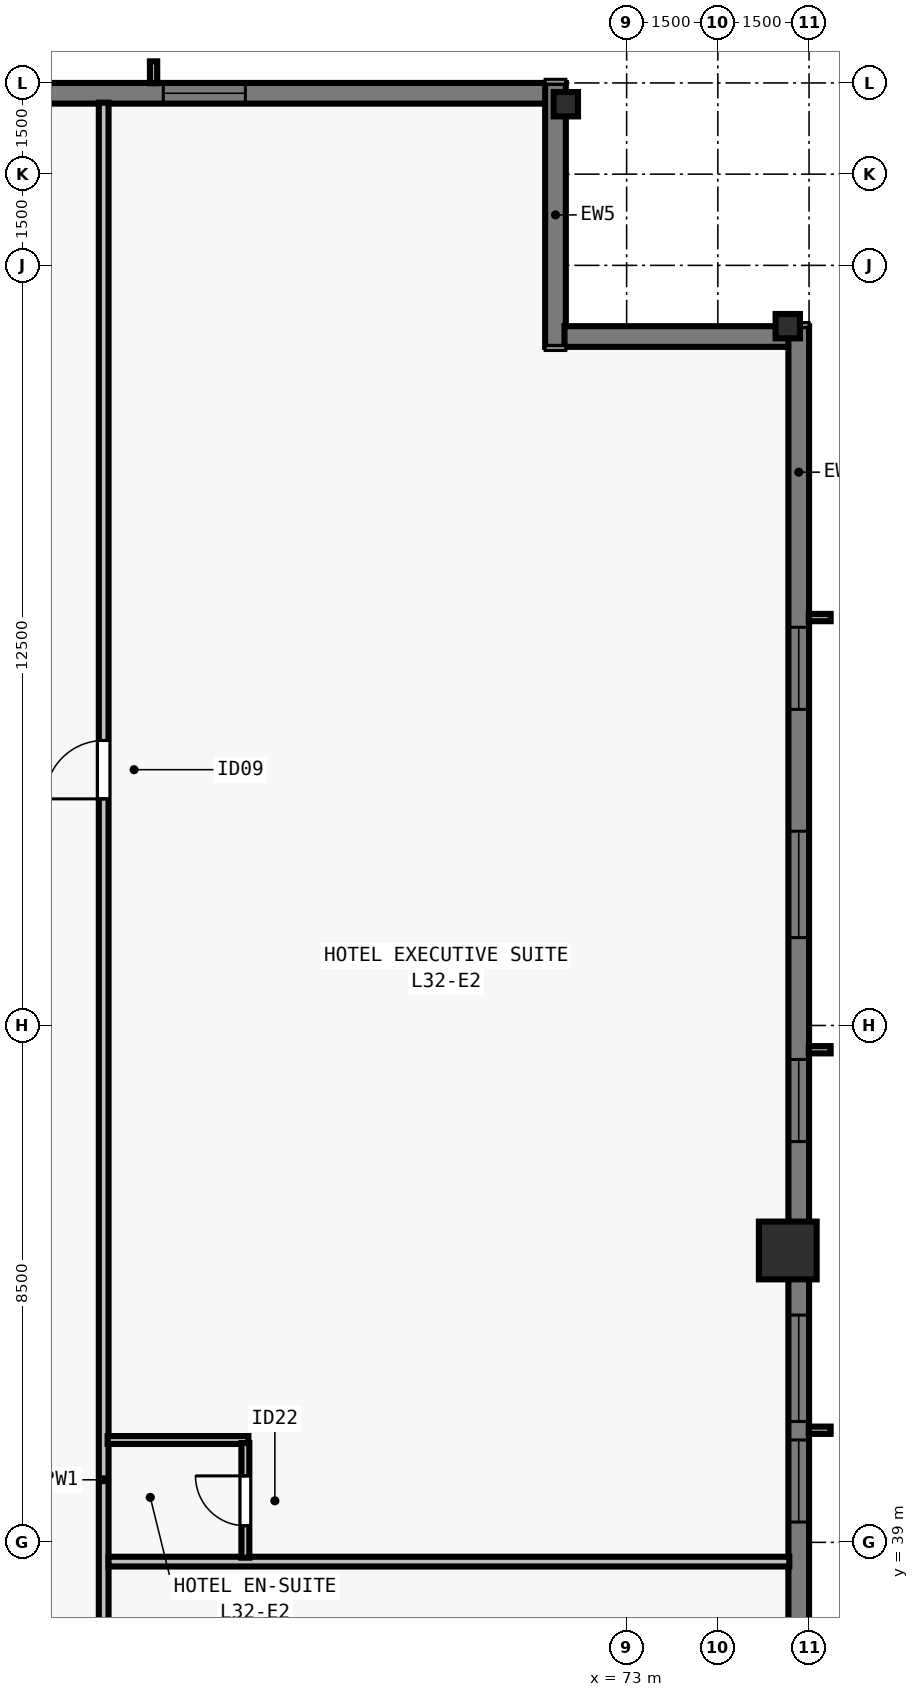
"""IFC4 building model, lengths in metres.
Left out: names, types, materials, properties, quantities, classifications, styles, units other than length and angle.
Written with IfcOpenShell. Run it as: python <this file> out.ifc"""

import sys

from ifc_helpers import new_model, si_unit, direction, frame, frame_2d, origin, origin_2d, place, context, subcontext, project, spatial, rectangle, i_section, extrude, element, fill, save


model = new_model("IFC4")
c1 = context("Model", 3, precision=1e-05, world=origin(), true_north=direction((0.0, 1.0)))
c2 = subcontext(c1, "Body", "Model", "MODEL_VIEW")
j1 = project(units=[si_unit("LENGTHUNIT", "METRE"), si_unit("PLANEANGLEUNIT", "RADIAN")], contexts=[c1])
p1 = place(None, origin())
s1 = spatial("IfcSite", under=j1, at=p1, CompositionType="ELEMENT")
p2 = place(p1, origin())
s2 = spatial("IfcBuilding", under=s1, at=p2, CompositionType="ELEMENT")
p3 = place(p2, frame((0.0, 0.0, 120.0)))
s3 = spatial("IfcBuildingStorey", under=s2, at=p3, CompositionType="ELEMENT", Elevation=120.0)
p4 = place(p3, frame((75.65, 43.8, 0.0), z_axis=(0.0, 0.0, 1.0), x_axis=(0.0, 1.0, 0.0)))
e1 = element("IfcColumn", 1, at=p4, inside=s3, PredefinedType="COLUMN", context=c2, shape_type="SweptSolid", body=[
    extrude(rectangle(XDim=0.95, YDim=0.95, at=origin_2d()), origin(), (0.0, 0.0, 1.0), 3.5),
])
for number, where, z_axis, x_axis in (
    (2, (75.65, 59.0, 0.0), (0.0, 0.0, 1.0), (0.0, 1.0, 0.0)),
    (3, (72.0, 62.65, 0.0), (0.0, 0.0, 1.0), (1.0, 0.0, 0.0)),
):
    element("IfcColumn", number, at=place(p3, frame(where, z_axis=z_axis, x_axis=x_axis)), inside=s3, PredefinedType="COLUMN", context=c2, shape_type="SweptSolid", body=[
        extrude(i_section(OverallWidth=0.4, OverallDepth=0.4, WebThickness=0.022, FlangeThickness=0.036, at=origin_2d()), origin(), (0.0, 0.0, 1.0), 3.5),
    ])
p5 = place(p3, frame((32.0, 62.83, 0.0), z_axis=(0.0, 0.0, 1.0), x_axis=(1.0, 0.0, 0.0)))
e4 = element("IfcWall", 4, at=p5, inside=s3, PredefinedType="SOLIDWALL", context=c2, shape_type="SweptSolid", body=[
    extrude(rectangle(XDim=39.682, YDim=0.34, at=frame_2d((19.841, 0.0))), origin(), (0.0, 0.0, 1.0), 3.28),
])
p6 = place(p5, frame((4.102, 0.0, 0.8)))
e5 = element("IfcOpeningElement", 5, at=p6, cuts=e4, PredefinedType="OPENING", context=c2, shape_type="SweptSolid", body=[
    extrude(rectangle(XDim=1.35, YDim=1.66, at=frame_2d((0.675, 0.83))), frame((0.0, 0.18, 0.0), z_axis=(0.0, -1.0, 0.0), x_axis=(1.0, 0.0, 0.0)), (0.0, 0.0, 1.0), 0.36),
])
p7 = place(p5, frame((8.755, 0.0, 0.8)))
e6 = element("IfcOpeningElement", 6, at=p7, cuts=e4, PredefinedType="OPENING", context=c2, shape_type="SweptSolid", body=[
    extrude(rectangle(XDim=1.75, YDim=1.66, at=frame_2d((0.875, 0.83))), frame((0.0, 0.18, 0.0), z_axis=(0.0, -1.0, 0.0), x_axis=(1.0, 0.0, 0.0)), (0.0, 0.0, 1.0), 0.36),
])
p8 = place(p5, frame((12.059, 0.0, 0.8)))
e7 = element("IfcOpeningElement", 7, at=p8, cuts=e4, PredefinedType="OPENING", context=c2, shape_type="SweptSolid", body=[
    extrude(rectangle(XDim=1.35, YDim=1.66, at=frame_2d((0.675, 0.83))), frame((0.0, 0.18, 0.0), z_axis=(0.0, -1.0, 0.0), x_axis=(1.0, 0.0, 0.0)), (0.0, 0.0, 1.0), 0.36),
])
p9 = place(p5, frame((16.262, 0.0, 0.8)))
e8 = element("IfcOpeningElement", 8, at=p9, cuts=e4, PredefinedType="OPENING", context=c2, shape_type="SweptSolid", body=[
    extrude(rectangle(XDim=1.75, YDim=1.66, at=frame_2d((0.875, 0.83))), frame((0.0, 0.18, 0.0), z_axis=(0.0, -1.0, 0.0), x_axis=(1.0, 0.0, 0.0)), (0.0, 0.0, 1.0), 0.36),
])
p10 = place(p5, frame((18.316, 0.0, 0.8)))
e9 = element("IfcOpeningElement", 9, at=p10, cuts=e4, PredefinedType="OPENING", context=c2, shape_type="SweptSolid", body=[
    extrude(rectangle(XDim=1.35, YDim=1.66, at=frame_2d((0.675, 0.83))), frame((0.0, 0.18, 0.0), z_axis=(0.0, -1.0, 0.0), x_axis=(1.0, 0.0, 0.0)), (0.0, 0.0, 1.0), 0.36),
])
p11 = place(p5, frame((22.07, 0.0, 0.8)))
e10 = element("IfcOpeningElement", 10, at=p11, cuts=e4, PredefinedType="OPENING", context=c2, shape_type="SweptSolid", body=[
    extrude(rectangle(XDim=1.75, YDim=1.66, at=frame_2d((0.875, 0.83))), frame((0.0, 0.18, 0.0), z_axis=(0.0, -1.0, 0.0), x_axis=(1.0, 0.0, 0.0)), (0.0, 0.0, 1.0), 0.36),
])
p12 = place(p5, frame((26.273, 0.0, 0.8)))
e11 = element("IfcOpeningElement", 11, at=p12, cuts=e4, PredefinedType="OPENING", context=c2, shape_type="SweptSolid", body=[
    extrude(rectangle(XDim=1.35, YDim=1.66, at=frame_2d((0.675, 0.83))), frame((0.0, 0.18, 0.0), z_axis=(0.0, -1.0, 0.0), x_axis=(1.0, 0.0, 0.0)), (0.0, 0.0, 1.0), 0.36),
])
p13 = place(p5, frame((33.38, 0.0, 0.8)))
e12 = element("IfcOpeningElement", 12, at=p13, cuts=e4, PredefinedType="OPENING", context=c2, shape_type="SweptSolid", body=[
    extrude(rectangle(XDim=1.35, YDim=1.66, at=frame_2d((0.675, 0.83))), frame((0.0, 0.18, 0.0), z_axis=(0.0, -1.0, 0.0), x_axis=(1.0, 0.0, 0.0)), (0.0, 0.0, 1.0), 0.36),
])
p14 = place(p3, frame((71.83, 63.0, 0.0), z_axis=(0.0, 0.0, 1.0), x_axis=(0.0, -1.0, 0.0)))
e13 = element("IfcWall", 13, at=p14, inside=s3, PredefinedType="SOLIDWALL", context=c2, shape_type="SweptSolid", body=[
    extrude(rectangle(XDim=4.34, YDim=0.34, at=frame_2d((2.17, 0.0))), origin(), (0.0, 0.0, 1.0), 3.28),
])
p15 = place(p3, frame((71.978, 58.83, 0.0), z_axis=(0.0, 0.0, 1.0), x_axis=(1.0, 0.0, 0.0)))
e14 = element("IfcWall", 14, at=p15, inside=s3, PredefinedType="SOLIDWALL", context=c2, shape_type="SweptSolid", body=[
    extrude(rectangle(XDim=3.704, YDim=0.34, at=frame_2d((1.852, 0.0))), origin(), (0.0, 0.0, 1.0), 3.28),
])
p16 = place(p3, frame((75.83, 59.0, 0.0), z_axis=(0.0, 0.0, 1.0), x_axis=(0.0, -1.0, 0.0)))
e15 = element("IfcWall", 15, at=p16, inside=s3, PredefinedType="SOLIDWALL", context=c2, shape_type="SweptSolid", body=[
    extrude(rectangle(XDim=39.682, YDim=0.34, at=frame_2d((19.841, 0.0))), origin(), (0.0, 0.0, 1.0), 3.28),
])
p17 = place(p16, frame((4.952, 0.0, 0.8)))
e16 = element("IfcOpeningElement", 16, at=p17, cuts=e15, PredefinedType="OPENING", context=c2, shape_type="SweptSolid", body=[
    extrude(rectangle(XDim=1.35, YDim=1.66, at=frame_2d((0.675, 0.83))), frame((0.0, 0.18, 0.0), z_axis=(0.0, -1.0, 0.0), x_axis=(1.0, 0.0, 0.0)), (0.0, 0.0, 1.0), 0.36),
])
p18 = place(p16, frame((8.305, 0.0, 0.8)))
e17 = element("IfcOpeningElement", 17, at=p18, cuts=e15, PredefinedType="OPENING", context=c2, shape_type="SweptSolid", body=[
    extrude(rectangle(XDim=1.75, YDim=1.66, at=frame_2d((0.875, 0.83))), frame((0.0, 0.18, 0.0), z_axis=(0.0, -1.0, 0.0), x_axis=(1.0, 0.0, 0.0)), (0.0, 0.0, 1.0), 0.36),
])
p19 = place(p16, frame((12.059, 0.0, 0.8)))
e18 = element("IfcOpeningElement", 18, at=p19, cuts=e15, PredefinedType="OPENING", context=c2, shape_type="SweptSolid", body=[
    extrude(rectangle(XDim=1.35, YDim=1.66, at=frame_2d((0.675, 0.83))), frame((0.0, 0.18, 0.0), z_axis=(0.0, -1.0, 0.0), x_axis=(1.0, 0.0, 0.0)), (0.0, 0.0, 1.0), 0.36),
])
p20 = place(p16, frame((16.262, 0.0, 0.8)))
e19 = element("IfcOpeningElement", 19, at=p20, cuts=e15, PredefinedType="OPENING", context=c2, shape_type="SweptSolid", body=[
    extrude(rectangle(XDim=1.75, YDim=1.66, at=frame_2d((0.875, 0.83))), frame((0.0, 0.18, 0.0), z_axis=(0.0, -1.0, 0.0), x_axis=(1.0, 0.0, 0.0)), (0.0, 0.0, 1.0), 0.36),
])
p21 = place(p16, frame((18.316, 0.0, 0.8)))
e20 = element("IfcOpeningElement", 20, at=p21, cuts=e15, PredefinedType="OPENING", context=c2, shape_type="SweptSolid", body=[
    extrude(rectangle(XDim=1.35, YDim=1.66, at=frame_2d((0.675, 0.83))), frame((0.0, 0.18, 0.0), z_axis=(0.0, -1.0, 0.0), x_axis=(1.0, 0.0, 0.0)), (0.0, 0.0, 1.0), 0.36),
])
p22 = place(p16, frame((22.07, 0.0, 0.8)))
e21 = element("IfcOpeningElement", 21, at=p22, cuts=e15, PredefinedType="OPENING", context=c2, shape_type="SweptSolid", body=[
    extrude(rectangle(XDim=1.75, YDim=1.66, at=frame_2d((0.875, 0.83))), frame((0.0, 0.18, 0.0), z_axis=(0.0, -1.0, 0.0), x_axis=(1.0, 0.0, 0.0)), (0.0, 0.0, 1.0), 0.36),
])
p23 = place(p16, frame((26.273, 0.0, 0.8)))
e22 = element("IfcOpeningElement", 22, at=p23, cuts=e15, PredefinedType="OPENING", context=c2, shape_type="SweptSolid", body=[
    extrude(rectangle(XDim=1.35, YDim=1.66, at=frame_2d((0.675, 0.83))), frame((0.0, 0.18, 0.0), z_axis=(0.0, -1.0, 0.0), x_axis=(1.0, 0.0, 0.0)), (0.0, 0.0, 1.0), 0.36),
])
p24 = place(p16, frame((29.627, 0.0, 0.8)))
e23 = element("IfcOpeningElement", 23, at=p24, cuts=e15, PredefinedType="OPENING", context=c2, shape_type="SweptSolid", body=[
    extrude(rectangle(XDim=1.75, YDim=1.66, at=frame_2d((0.875, 0.83))), frame((0.0, 0.18, 0.0), z_axis=(0.0, -1.0, 0.0), x_axis=(1.0, 0.0, 0.0)), (0.0, 0.0, 1.0), 0.36),
])
p25 = place(p16, frame((33.38, 0.0, 0.8)))
e24 = element("IfcOpeningElement", 24, at=p25, cuts=e15, PredefinedType="OPENING", context=c2, shape_type="SweptSolid", body=[
    extrude(rectangle(XDim=1.35, YDim=1.66, at=frame_2d((0.675, 0.83))), frame((0.0, 0.18, 0.0), z_axis=(0.0, -1.0, 0.0), x_axis=(1.0, 0.0, 0.0)), (0.0, 0.0, 1.0), 0.36),
])
p26 = place(p3, frame((64.4, 15.325, 0.0), z_axis=(0.0, 0.0, 1.0), x_axis=(0.0, 1.0, 0.0)))
e25 = element("IfcWall", 25, at=p26, inside=s3, PredefinedType="PARTITIONING", context=c2, shape_type="SweptSolid", body=[
    extrude(rectangle(XDim=47.35, YDim=0.16, at=frame_2d((23.675, 0.0))), origin(), (0.0, 0.0, 1.0), 2.555),
])
p27 = place(p26, frame((12.547, 0.0, 0.0)))
e26 = element("IfcOpeningElement", 26, at=p27, cuts=e25, PredefinedType="OPENING", context=c2, shape_type="SweptSolid", body=[
    extrude(rectangle(XDim=0.96, YDim=2.15, at=frame_2d((0.48, 1.075))), frame((0.0, 0.09, 0.0), z_axis=(0.0, -1.0, 0.0), x_axis=(1.0, 0.0, 0.0)), (0.0, 0.0, 1.0), 0.18),
])
p28 = place(p26, frame((35.902, 0.0, 0.0)))
e27 = element("IfcOpeningElement", 27, at=p28, cuts=e25, PredefinedType="OPENING", context=c2, shape_type="SweptSolid", body=[
    extrude(rectangle(XDim=0.96, YDim=2.15, at=frame_2d((0.48, 1.075))), frame((0.0, 0.09, 0.0), z_axis=(0.0, -1.0, 0.0), x_axis=(1.0, 0.0, 0.0)), (0.0, 0.0, 1.0), 0.18),
])
p29 = place(p3, frame((64.48, 38.683, 0.0), z_axis=(0.0, 0.0, 1.0), x_axis=(1.0, 0.0, 0.0)))
e28 = element("IfcWall", 28, at=p29, inside=s3, PredefinedType="PARTITIONING", context=c2, shape_type="SweptSolid", body=[
    extrude(rectangle(XDim=11.195, YDim=0.16, at=frame_2d((5.598, 0.0))), origin(), (0.0, 0.0, 1.0), 3.28),
])
p30 = place(p3, frame((64.465, 40.683, 0.0), z_axis=(0.0, 0.0, 1.0), x_axis=(1.0, 0.0, 0.0)))
e29 = element("IfcWall", 29, at=p30, inside=s3, PredefinedType="PLUMBINGWALL", context=c2, shape_type="SweptSolid", body=[
    extrude(rectangle(XDim=2.315, YDim=0.13, at=frame_2d((1.157, 0.0))), origin(), (0.0, 0.0, 1.0), 3.28),
])
p31 = place(p3, frame((66.73, 38.748, 0.0), z_axis=(0.0, 0.0, 1.0), x_axis=(0.0, 1.0, 0.0)))
e30 = element("IfcWall", 30, at=p31, inside=s3, PredefinedType="PLUMBINGWALL", context=c2, shape_type="SweptSolid", body=[
    extrude(rectangle(XDim=1.885, YDim=0.13, at=frame_2d((0.942, 0.0))), origin(), (0.0, 0.0, 1.0), 3.28),
])
p32 = place(p31, frame((0.525, 0.0, 0.0)))
e31 = element("IfcOpeningElement", 31, at=p32, cuts=e30, PredefinedType="OPENING", context=c2, shape_type="SweptSolid", body=[
    extrude(rectangle(XDim=0.82, YDim=2.1, at=frame_2d((0.41, 1.05))), frame((0.0, 0.075, 0.0), z_axis=(0.0, -1.0, 0.0), x_axis=(1.0, 0.0, 0.0)), (0.0, 0.0, 1.0), 0.15),
])
p33 = place(p13, origin())
e32 = element("IfcWindow", 32, at=p33, inside=s3, PartitioningType="SINGLE_PANEL", PredefinedType="WINDOW", context=c2, shape_type="SweptSolid", body=[
    extrude(rectangle(XDim=1.35, YDim=1.66, at=frame_2d((0.675, 0.83))), frame((0.0, -0.05, 0.0), z_axis=(0.0, -1.0, 0.0), x_axis=(1.0, 0.0, 0.0)), (0.0, 0.0, 1.0), 0.06),
])
fill(e12, e32)
p34 = place(p17, origin())
e33 = element("IfcWindow", 33, at=p34, inside=s3, PartitioningType="SINGLE_PANEL", PredefinedType="WINDOW", context=c2, shape_type="SweptSolid", body=[
    extrude(rectangle(XDim=1.35, YDim=1.66, at=frame_2d((0.675, 0.83))), frame((0.0, -0.05, 0.0), z_axis=(0.0, -1.0, 0.0), x_axis=(1.0, 0.0, 0.0)), (0.0, 0.0, 1.0), 0.06),
])
fill(e16, e33)
p35 = place(p18, origin())
e34 = element("IfcWindow", 34, at=p35, inside=s3, PartitioningType="SINGLE_PANEL", PredefinedType="WINDOW", context=c2, shape_type="SweptSolid", body=[
    extrude(rectangle(XDim=1.75, YDim=1.66, at=frame_2d((0.875, 0.83))), frame((0.0, -0.05, 0.0), z_axis=(0.0, -1.0, 0.0), x_axis=(1.0, 0.0, 0.0)), (0.0, 0.0, 1.0), 0.06),
])
fill(e17, e34)
p36 = place(p19, origin())
e35 = element("IfcWindow", 35, at=p36, inside=s3, PartitioningType="SINGLE_PANEL", PredefinedType="WINDOW", context=c2, shape_type="SweptSolid", body=[
    extrude(rectangle(XDim=1.35, YDim=1.66, at=frame_2d((0.675, 0.83))), frame((0.0, -0.05, 0.0), z_axis=(0.0, -1.0, 0.0), x_axis=(1.0, 0.0, 0.0)), (0.0, 0.0, 1.0), 0.06),
])
fill(e18, e35)
p37 = place(p20, origin())
e36 = element("IfcWindow", 36, at=p37, inside=s3, PartitioningType="SINGLE_PANEL", PredefinedType="WINDOW", context=c2, shape_type="SweptSolid", body=[
    extrude(rectangle(XDim=1.75, YDim=1.66, at=frame_2d((0.875, 0.83))), frame((0.0, -0.05, 0.0), z_axis=(0.0, -1.0, 0.0), x_axis=(1.0, 0.0, 0.0)), (0.0, 0.0, 1.0), 0.06),
])
fill(e19, e36)
p38 = place(p21, origin())
e37 = element("IfcWindow", 37, at=p38, inside=s3, PartitioningType="SINGLE_PANEL", PredefinedType="WINDOW", context=c2, shape_type="SweptSolid", body=[
    extrude(rectangle(XDim=1.35, YDim=1.66, at=frame_2d((0.675, 0.83))), frame((0.0, -0.05, 0.0), z_axis=(0.0, -1.0, 0.0), x_axis=(1.0, 0.0, 0.0)), (0.0, 0.0, 1.0), 0.06),
])
fill(e20, e37)
p39 = place(p32, origin())
e38 = element("IfcDoor", 38, at=p39, inside=s3, OperationType="SINGLE_SWING_RIGHT", PredefinedType="DOOR", context=c2, shape_type="SweptSolid", body=[
    extrude(rectangle(XDim=0.82, YDim=2.1, at=frame_2d((0.41, 1.05))), frame((0.0, 0.025, 0.0), z_axis=(0.0, -1.0, 0.0), x_axis=(1.0, 0.0, 0.0)), (0.0, 0.0, 1.0), 0.05),
])
fill(e31, e38)
p40 = place(p28, origin())
e39 = element("IfcDoor", 39, at=p40, inside=s3, OperationType="SINGLE_SWING_LEFT", PredefinedType="DOOR", context=c2, shape_type="SweptSolid", body=[
    extrude(rectangle(XDim=0.96, YDim=2.15, at=frame_2d((0.48, 1.075))), frame((0.0, 0.025, 0.0), z_axis=(0.0, -1.0, 0.0), x_axis=(1.0, 0.0, 0.0)), (0.0, 0.0, 1.0), 0.05),
])
fill(e27, e39)
save(model, sys.argv[1])
